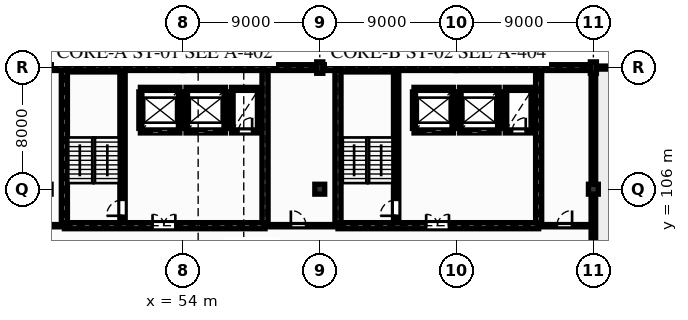
"""IFC4 building model, lengths in metres.
Left out: names, types, materials, properties, quantities, classifications, styles, units other than length and angle.
Written with IfcOpenShell. Run it as: python <this file> out.ifc"""

import sys

from ifc_helpers import new_model, si_unit, direction, frame, frame_2d, origin, origin_2d, place, context, subcontext, project, spatial, rectangle, extrude, element, fill, save


model = new_model("IFC4")
c1 = context("Model", 3, precision=1e-05, world=origin(), true_north=direction((0.0, 1.0)))
c2 = subcontext(c1, "Body", "Model", "MODEL_VIEW")
j1 = project(units=[si_unit("LENGTHUNIT", "METRE"), si_unit("PLANEANGLEUNIT", "RADIAN")], contexts=[c1])
p1 = place(None, origin())
s1 = spatial("IfcSite", under=j1, at=p1, CompositionType="ELEMENT")
p2 = place(p1, origin())
s2 = spatial("IfcBuilding", under=s1, at=p2, CompositionType="ELEMENT")
p3 = place(p2, frame((0.0, 0.0, 16.52)))
s3 = spatial("IfcBuildingStorey", under=s2, at=p3, CompositionType="ELEMENT", Elevation=16.52)
p4 = place(p3, frame((63.0, 106.0, 0.0), z_axis=(0.0, 0.0, 1.0), x_axis=(1.0, 0.0, 0.0)))
e1 = element("IfcColumn", 1, at=p4, inside=s3, PredefinedType="COLUMN", context=c2, shape_type="SweptSolid", body=[
    extrude(rectangle(XDim=0.65, YDim=0.65, at=origin_2d()), origin(), (0.0, 0.0, 1.0), 3.74),
])
p5 = place(p3, frame((63.0, 114.0, 0.0), z_axis=(0.0, 0.0, 1.0), x_axis=(0.0, 1.0, 0.0)))
e2 = element("IfcColumn", 2, at=p5, inside=s3, PredefinedType="COLUMN", context=c2, shape_type="SweptSolid", body=[
    extrude(rectangle(XDim=0.4, YDim=0.75, at=origin_2d()), origin(), (0.0, 0.0, 1.0), 3.74),
])
p6 = place(p3, frame((81.0, 106.0, 0.0), z_axis=(0.0, 0.0, 1.0), x_axis=(1.0, 0.0, 0.0)))
e3 = element("IfcColumn", 3, at=p6, inside=s3, PredefinedType="COLUMN", context=c2, shape_type="SweptSolid", body=[
    extrude(rectangle(XDim=0.65, YDim=0.65, at=origin_2d()), origin(), (0.0, 0.0, 1.0), 3.74),
])
p7 = place(p3, frame((81.0, 114.0, 0.0), z_axis=(0.0, 0.0, 1.0), x_axis=(0.0, 1.0, 0.0)))
e4 = element("IfcColumn", 4, at=p7, inside=s3, PredefinedType="COLUMN", context=c2, shape_type="SweptSolid", body=[
    extrude(rectangle(XDim=0.4, YDim=0.75, at=origin_2d()), origin(), (0.0, 0.0, 1.0), 3.74),
])
for number, where, z_axis, x_axis in (
    (5, (45.0, 114.0, 0.0), (0.0, 0.0, 1.0), (1.0, 0.0, 0.0)),
    (6, (54.0, 114.0, 0.0), (0.0, 0.0, 1.0), (1.0, 0.0, 0.0)),
    (7, (63.0, 114.0, 0.0), (0.0, 0.0, 1.0), (1.0, 0.0, 0.0)),
    (8, (72.0, 114.0, 0.0), (0.0, 0.0, 1.0), (1.0, 0.0, 0.0)),
):
    element("IfcWall", number, at=place(p3, frame(where, z_axis=z_axis, x_axis=x_axis)), inside=s3, PredefinedType="SOLIDWALL", context=c2, shape_type="SweptSolid", body=[
        extrude(rectangle(XDim=9.0, YDim=0.38, at=frame_2d((4.5, 0.0))), origin(), (0.0, 0.0, 1.0), 3.46),
    ])
p8 = place(p3, frame((81.0, 90.0, 0.0), z_axis=(0.0, 0.0, 1.0), x_axis=(0.0, 1.0, 0.0)))
e9 = element("IfcWall", 9, at=p8, inside=s3, PredefinedType="SOLIDWALL", context=c2, shape_type="SweptSolid", body=[
    extrude(rectangle(XDim=24.0, YDim=0.3, at=frame_2d((12.0, 0.0))), origin(), (0.0, 0.0, 1.0), 2.65),
])
p9 = place(p8, frame((3.2, 0.0, 0.43)))
e10 = element("IfcOpeningElement", 10, at=p9, cuts=e9, PredefinedType="OPENING", context=c2, shape_type="SweptSolid", body=[
    extrude(rectangle(XDim=1.5, YDim=2.1, at=frame_2d((0.75, 1.05))), frame((0.0, 0.16, 0.0), z_axis=(0.0, -1.0, 0.0), x_axis=(1.0, 0.0, 0.0)), (0.0, 0.0, 1.0), 0.32),
])
p10 = place(p8, frame((10.5, 0.0, 0.68)))
e11 = element("IfcOpeningElement", 11, at=p10, cuts=e9, PredefinedType="OPENING", context=c2, shape_type="SweptSolid", body=[
    extrude(rectangle(XDim=1.35, YDim=1.85, at=frame_2d((0.675, 0.925))), frame((0.0, 0.16, 0.0), z_axis=(0.0, -1.0, 0.0), x_axis=(1.0, 0.0, 0.0)), (0.0, 0.0, 1.0), 0.32),
])
p11 = place(p3, frame((89.8, 114.0, 0.0), z_axis=(0.0, 0.0, 1.0), x_axis=(-1.0, 0.0, 0.0)))
e12 = element("IfcWall", 12, at=p11, inside=s3, PredefinedType="PARAPET", context=c2, shape_type="SweptSolid", body=[
    extrude(rectangle(XDim=8.6, YDim=0.2, at=frame_2d((4.3, 0.0))), origin(), (0.0, 0.0, 1.0), 0.72),
])
p12 = place(p3, frame((46.2, 103.6, 0.0), z_axis=(0.0, 0.0, 1.0), x_axis=(1.0, 0.0, 0.0)))
e13 = element("IfcWall", 13, at=p12, inside=s3, PredefinedType="SHEAR", context=c2, shape_type="SweptSolid", body=[
    extrude(rectangle(XDim=13.2, YDim=0.4, at=frame_2d((6.6, 0.0))), origin(), (0.0, 0.0, 1.0), 3.46),
])
p13 = place(p12, frame((5.8, 0.0, 0.0)))
e14 = element("IfcOpeningElement", 14, at=p13, cuts=e13, PredefinedType="OPENING", context=c2, shape_type="SweptSolid", body=[
    extrude(rectangle(XDim=1.5, YDim=2.2, at=frame_2d((0.75, 1.1))), frame((0.0, 0.21, 0.0), z_axis=(0.0, -1.0, 0.0), x_axis=(1.0, 0.0, 0.0)), (0.0, 0.0, 1.0), 0.42),
])
for number, where, z_axis, x_axis in (
    (15, (46.2, 103.8, 0.0), (0.0, 0.0, 1.0), (0.0, 1.0, 0.0)),
    (16, (59.4, 103.8, 0.0), (0.0, 0.0, 1.0), (0.0, 1.0, 0.0)),
):
    element("IfcWall", number, at=place(p3, frame(where, z_axis=z_axis, x_axis=x_axis)), inside=s3, PredefinedType="SHEAR", context=c2, shape_type="SweptSolid", body=[
        extrude(rectangle(XDim=10.01, YDim=0.4, at=frame_2d((5.005, 0.0))), origin(), (0.0, 0.0, 1.0), 3.46),
    ])
p14 = place(p3, frame((50.025, 103.8, 0.0), z_axis=(0.0, 0.0, 1.0), x_axis=(0.0, 1.0, 0.0)))
e17 = element("IfcWall", 17, at=p14, inside=s3, PredefinedType="SHEAR", context=c2, shape_type="SweptSolid", body=[
    extrude(rectangle(XDim=10.01, YDim=0.35, at=frame_2d((5.005, 0.0))), origin(), (0.0, 0.0, 1.0), 3.46),
])
p15 = place(p14, frame((0.45, 0.0, 0.0)))
e18 = element("IfcOpeningElement", 18, at=p15, cuts=e17, PredefinedType="OPENING", context=c2, shape_type="SweptSolid", body=[
    extrude(rectangle(XDim=1.05, YDim=2.2, at=frame_2d((0.525, 1.1))), frame((0.0, 0.185, 0.0), z_axis=(0.0, -1.0, 0.0), x_axis=(1.0, 0.0, 0.0)), (0.0, 0.0, 1.0), 0.37),
])
p16 = place(p3, frame((51.2, 109.8, 0.0), z_axis=(0.0, 0.0, 1.0), x_axis=(1.0, 0.0, 0.0)))
e19 = element("IfcWall", 19, at=p16, inside=s3, PredefinedType="PARTITIONING", context=c2, shape_type="SweptSolid", body=[
    extrude(rectangle(XDim=2.6, YDim=0.2, at=frame_2d((1.3, 0.0))), origin(), (0.0, 0.0, 1.0), 3.46),
])
p17 = place(p16, frame((0.75, 0.0, 0.0)))
e20 = element("IfcOpeningElement", 20, at=p17, cuts=e19, PredefinedType="OPENING", context=c2, shape_type="SweptSolid", body=[
    extrude(rectangle(XDim=1.1, YDim=2.15, at=frame_2d((0.55, 1.075))), frame((0.0, 0.11, 0.0), z_axis=(0.0, -1.0, 0.0), x_axis=(1.0, 0.0, 0.0)), (0.0, 0.0, 1.0), 0.22),
])
p18 = place(p3, frame((51.2, 112.6, 0.0), z_axis=(0.0, 0.0, 1.0), x_axis=(1.0, 0.0, 0.0)))
e21 = element("IfcWall", 21, at=p18, inside=s3, PredefinedType="PARTITIONING", context=c2, shape_type="SweptSolid", body=[
    extrude(rectangle(XDim=2.6, YDim=0.2, at=frame_2d((1.3, 0.0))), origin(), (0.0, 0.0, 1.0), 3.46),
])
for number, where, z_axis, x_axis in (
    (22, (51.2, 110.0, 0.0), (0.0, 0.0, 1.0), (0.0, 1.0, 0.0)),
    (23, (53.8, 110.0, 0.0), (0.0, 0.0, 1.0), (0.0, 1.0, 0.0)),
):
    element("IfcWall", number, at=place(p3, frame(where, z_axis=z_axis, x_axis=x_axis)), inside=s3, PredefinedType="PARTITIONING", context=c2, shape_type="SweptSolid", body=[
        extrude(rectangle(XDim=2.4, YDim=0.2, at=frame_2d((1.2, 0.0))), origin(), (0.0, 0.0, 1.0), 3.46),
    ])
p19 = place(p3, frame((54.2, 109.8, 0.0), z_axis=(0.0, 0.0, 1.0), x_axis=(1.0, 0.0, 0.0)))
e24 = element("IfcWall", 24, at=p19, inside=s3, PredefinedType="PARTITIONING", context=c2, shape_type="SweptSolid", body=[
    extrude(rectangle(XDim=2.6, YDim=0.2, at=frame_2d((1.3, 0.0))), origin(), (0.0, 0.0, 1.0), 3.46),
])
p20 = place(p19, frame((0.75, 0.0, 0.0)))
e25 = element("IfcOpeningElement", 25, at=p20, cuts=e24, PredefinedType="OPENING", context=c2, shape_type="SweptSolid", body=[
    extrude(rectangle(XDim=1.1, YDim=2.15, at=frame_2d((0.55, 1.075))), frame((0.0, 0.11, 0.0), z_axis=(0.0, -1.0, 0.0), x_axis=(1.0, 0.0, 0.0)), (0.0, 0.0, 1.0), 0.22),
])
p21 = place(p3, frame((54.2, 112.6, 0.0), z_axis=(0.0, 0.0, 1.0), x_axis=(1.0, 0.0, 0.0)))
e26 = element("IfcWall", 26, at=p21, inside=s3, PredefinedType="PARTITIONING", context=c2, shape_type="SweptSolid", body=[
    extrude(rectangle(XDim=2.6, YDim=0.2, at=frame_2d((1.3, 0.0))), origin(), (0.0, 0.0, 1.0), 3.46),
])
for number, where, z_axis, x_axis in (
    (27, (54.2, 110.0, 0.0), (0.0, 0.0, 1.0), (0.0, 1.0, 0.0)),
    (28, (56.8, 110.0, 0.0), (0.0, 0.0, 1.0), (0.0, 1.0, 0.0)),
):
    element("IfcWall", number, at=place(p3, frame(where, z_axis=z_axis, x_axis=x_axis)), inside=s3, PredefinedType="PARTITIONING", context=c2, shape_type="SweptSolid", body=[
        extrude(rectangle(XDim=2.4, YDim=0.2, at=frame_2d((1.2, 0.0))), origin(), (0.0, 0.0, 1.0), 3.46),
    ])
p22 = place(p3, frame((57.2, 109.8, 0.0), z_axis=(0.0, 0.0, 1.0), x_axis=(1.0, 0.0, 0.0)))
e29 = element("IfcWall", 29, at=p22, inside=s3, PredefinedType="PARTITIONING", context=c2, shape_type="SweptSolid", body=[
    extrude(rectangle(XDim=1.8, YDim=0.2, at=frame_2d((0.9, 0.0))), origin(), (0.0, 0.0, 1.0), 3.46),
])
p23 = place(p22, frame((0.45, 0.0, 0.0)))
e30 = element("IfcOpeningElement", 30, at=p23, cuts=e29, PredefinedType="OPENING", context=c2, shape_type="SweptSolid", body=[
    extrude(rectangle(XDim=0.9, YDim=2.1, at=frame_2d((0.45, 1.05))), frame((0.0, 0.11, 0.0), z_axis=(0.0, -1.0, 0.0), x_axis=(1.0, 0.0, 0.0)), (0.0, 0.0, 1.0), 0.22),
])
p24 = place(p3, frame((57.2, 112.6, 0.0), z_axis=(0.0, 0.0, 1.0), x_axis=(1.0, 0.0, 0.0)))
e31 = element("IfcWall", 31, at=p24, inside=s3, PredefinedType="PARTITIONING", context=c2, shape_type="SweptSolid", body=[
    extrude(rectangle(XDim=1.8, YDim=0.2, at=frame_2d((0.9, 0.0))), origin(), (0.0, 0.0, 1.0), 3.46),
])
for number, where, z_axis, x_axis in (
    (32, (57.2, 110.0, 0.0), (0.0, 0.0, 1.0), (0.0, 1.0, 0.0)),
    (33, (59.0, 110.0, 0.0), (0.0, 0.0, 1.0), (0.0, 1.0, 0.0)),
):
    element("IfcWall", number, at=place(p3, frame(where, z_axis=z_axis, x_axis=x_axis)), inside=s3, PredefinedType="PARTITIONING", context=c2, shape_type="SweptSolid", body=[
        extrude(rectangle(XDim=2.4, YDim=0.2, at=frame_2d((1.2, 0.0))), origin(), (0.0, 0.0, 1.0), 3.46),
    ])
p25 = place(p3, frame((64.2, 103.6, 0.0), z_axis=(0.0, 0.0, 1.0), x_axis=(1.0, 0.0, 0.0)))
e34 = element("IfcWall", 34, at=p25, inside=s3, PredefinedType="SHEAR", context=c2, shape_type="SweptSolid", body=[
    extrude(rectangle(XDim=13.2, YDim=0.4, at=frame_2d((6.6, 0.0))), origin(), (0.0, 0.0, 1.0), 3.46),
])
p26 = place(p25, frame((5.8, 0.0, 0.0)))
e35 = element("IfcOpeningElement", 35, at=p26, cuts=e34, PredefinedType="OPENING", context=c2, shape_type="SweptSolid", body=[
    extrude(rectangle(XDim=1.5, YDim=2.2, at=frame_2d((0.75, 1.1))), frame((0.0, 0.21, 0.0), z_axis=(0.0, -1.0, 0.0), x_axis=(1.0, 0.0, 0.0)), (0.0, 0.0, 1.0), 0.42),
])
for number, where, z_axis, x_axis in (
    (36, (64.2, 103.8, 0.0), (0.0, 0.0, 1.0), (0.0, 1.0, 0.0)),
    (37, (77.4, 103.8, 0.0), (0.0, 0.0, 1.0), (0.0, 1.0, 0.0)),
):
    element("IfcWall", number, at=place(p3, frame(where, z_axis=z_axis, x_axis=x_axis)), inside=s3, PredefinedType="SHEAR", context=c2, shape_type="SweptSolid", body=[
        extrude(rectangle(XDim=10.01, YDim=0.4, at=frame_2d((5.005, 0.0))), origin(), (0.0, 0.0, 1.0), 3.46),
    ])
p27 = place(p3, frame((68.025, 103.8, 0.0), z_axis=(0.0, 0.0, 1.0), x_axis=(0.0, 1.0, 0.0)))
e38 = element("IfcWall", 38, at=p27, inside=s3, PredefinedType="SHEAR", context=c2, shape_type="SweptSolid", body=[
    extrude(rectangle(XDim=10.01, YDim=0.35, at=frame_2d((5.005, 0.0))), origin(), (0.0, 0.0, 1.0), 3.46),
])
p28 = place(p27, frame((0.45, 0.0, 0.0)))
e39 = element("IfcOpeningElement", 39, at=p28, cuts=e38, PredefinedType="OPENING", context=c2, shape_type="SweptSolid", body=[
    extrude(rectangle(XDim=1.05, YDim=2.2, at=frame_2d((0.525, 1.1))), frame((0.0, 0.185, 0.0), z_axis=(0.0, -1.0, 0.0), x_axis=(1.0, 0.0, 0.0)), (0.0, 0.0, 1.0), 0.37),
])
p29 = place(p3, frame((69.2, 109.8, 0.0), z_axis=(0.0, 0.0, 1.0), x_axis=(1.0, 0.0, 0.0)))
e40 = element("IfcWall", 40, at=p29, inside=s3, PredefinedType="PARTITIONING", context=c2, shape_type="SweptSolid", body=[
    extrude(rectangle(XDim=2.6, YDim=0.2, at=frame_2d((1.3, 0.0))), origin(), (0.0, 0.0, 1.0), 3.46),
])
p30 = place(p29, frame((0.75, 0.0, 0.0)))
e41 = element("IfcOpeningElement", 41, at=p30, cuts=e40, PredefinedType="OPENING", context=c2, shape_type="SweptSolid", body=[
    extrude(rectangle(XDim=1.1, YDim=2.15, at=frame_2d((0.55, 1.075))), frame((0.0, 0.11, 0.0), z_axis=(0.0, -1.0, 0.0), x_axis=(1.0, 0.0, 0.0)), (0.0, 0.0, 1.0), 0.22),
])
p31 = place(p3, frame((69.2, 112.6, 0.0), z_axis=(0.0, 0.0, 1.0), x_axis=(1.0, 0.0, 0.0)))
e42 = element("IfcWall", 42, at=p31, inside=s3, PredefinedType="PARTITIONING", context=c2, shape_type="SweptSolid", body=[
    extrude(rectangle(XDim=2.6, YDim=0.2, at=frame_2d((1.3, 0.0))), origin(), (0.0, 0.0, 1.0), 3.46),
])
for number, where, z_axis, x_axis in (
    (43, (69.2, 110.0, 0.0), (0.0, 0.0, 1.0), (0.0, 1.0, 0.0)),
    (44, (71.8, 110.0, 0.0), (0.0, 0.0, 1.0), (0.0, 1.0, 0.0)),
):
    element("IfcWall", number, at=place(p3, frame(where, z_axis=z_axis, x_axis=x_axis)), inside=s3, PredefinedType="PARTITIONING", context=c2, shape_type="SweptSolid", body=[
        extrude(rectangle(XDim=2.4, YDim=0.2, at=frame_2d((1.2, 0.0))), origin(), (0.0, 0.0, 1.0), 3.46),
    ])
p32 = place(p3, frame((72.2, 109.8, 0.0), z_axis=(0.0, 0.0, 1.0), x_axis=(1.0, 0.0, 0.0)))
e45 = element("IfcWall", 45, at=p32, inside=s3, PredefinedType="PARTITIONING", context=c2, shape_type="SweptSolid", body=[
    extrude(rectangle(XDim=2.6, YDim=0.2, at=frame_2d((1.3, 0.0))), origin(), (0.0, 0.0, 1.0), 3.46),
])
p33 = place(p32, frame((0.75, 0.0, 0.0)))
e46 = element("IfcOpeningElement", 46, at=p33, cuts=e45, PredefinedType="OPENING", context=c2, shape_type="SweptSolid", body=[
    extrude(rectangle(XDim=1.1, YDim=2.15, at=frame_2d((0.55, 1.075))), frame((0.0, 0.11, 0.0), z_axis=(0.0, -1.0, 0.0), x_axis=(1.0, 0.0, 0.0)), (0.0, 0.0, 1.0), 0.22),
])
p34 = place(p3, frame((72.2, 112.6, 0.0), z_axis=(0.0, 0.0, 1.0), x_axis=(1.0, 0.0, 0.0)))
e47 = element("IfcWall", 47, at=p34, inside=s3, PredefinedType="PARTITIONING", context=c2, shape_type="SweptSolid", body=[
    extrude(rectangle(XDim=2.6, YDim=0.2, at=frame_2d((1.3, 0.0))), origin(), (0.0, 0.0, 1.0), 3.46),
])
for number, where, z_axis, x_axis in (
    (48, (72.2, 110.0, 0.0), (0.0, 0.0, 1.0), (0.0, 1.0, 0.0)),
    (49, (74.8, 110.0, 0.0), (0.0, 0.0, 1.0), (0.0, 1.0, 0.0)),
):
    element("IfcWall", number, at=place(p3, frame(where, z_axis=z_axis, x_axis=x_axis)), inside=s3, PredefinedType="PARTITIONING", context=c2, shape_type="SweptSolid", body=[
        extrude(rectangle(XDim=2.4, YDim=0.2, at=frame_2d((1.2, 0.0))), origin(), (0.0, 0.0, 1.0), 3.46),
    ])
p35 = place(p3, frame((75.2, 109.8, 0.0), z_axis=(0.0, 0.0, 1.0), x_axis=(1.0, 0.0, 0.0)))
e50 = element("IfcWall", 50, at=p35, inside=s3, PredefinedType="PARTITIONING", context=c2, shape_type="SweptSolid", body=[
    extrude(rectangle(XDim=1.8, YDim=0.2, at=frame_2d((0.9, 0.0))), origin(), (0.0, 0.0, 1.0), 3.46),
])
p36 = place(p35, frame((0.45, 0.0, 0.0)))
e51 = element("IfcOpeningElement", 51, at=p36, cuts=e50, PredefinedType="OPENING", context=c2, shape_type="SweptSolid", body=[
    extrude(rectangle(XDim=0.9, YDim=2.1, at=frame_2d((0.45, 1.05))), frame((0.0, 0.11, 0.0), z_axis=(0.0, -1.0, 0.0), x_axis=(1.0, 0.0, 0.0)), (0.0, 0.0, 1.0), 0.22),
])
p37 = place(p3, frame((75.2, 112.6, 0.0), z_axis=(0.0, 0.0, 1.0), x_axis=(1.0, 0.0, 0.0)))
e52 = element("IfcWall", 52, at=p37, inside=s3, PredefinedType="PARTITIONING", context=c2, shape_type="SweptSolid", body=[
    extrude(rectangle(XDim=1.8, YDim=0.2, at=frame_2d((0.9, 0.0))), origin(), (0.0, 0.0, 1.0), 3.46),
])
for number, where, z_axis, x_axis in (
    (53, (75.2, 110.0, 0.0), (0.0, 0.0, 1.0), (0.0, 1.0, 0.0)),
    (54, (77.0, 110.0, 0.0), (0.0, 0.0, 1.0), (0.0, 1.0, 0.0)),
):
    element("IfcWall", number, at=place(p3, frame(where, z_axis=z_axis, x_axis=x_axis)), inside=s3, PredefinedType="PARTITIONING", context=c2, shape_type="SweptSolid", body=[
        extrude(rectangle(XDim=2.4, YDim=0.2, at=frame_2d((1.2, 0.0))), origin(), (0.0, 0.0, 1.0), 3.46),
    ])
p38 = place(p3, frame((36.0, 103.6, 0.0), z_axis=(0.0, 0.0, 1.0), x_axis=(1.0, 0.0, 0.0)))
e55 = element("IfcWall", 55, at=p38, inside=s3, PredefinedType="PARTITIONING", context=c2, shape_type="SweptSolid", body=[
    extrude(rectangle(XDim=10.2, YDim=0.15, at=frame_2d((5.1, 0.0))), origin(), (0.0, 0.0, 1.0), 3.46),
])
p39 = place(p38, frame((4.5, 0.0, 0.0)))
e56 = element("IfcOpeningElement", 56, at=p39, cuts=e55, PredefinedType="OPENING", context=c2, shape_type="SweptSolid", body=[
    extrude(rectangle(XDim=1.0, YDim=2.15, at=frame_2d((0.5, 1.075))), frame((0.0, 0.085, 0.0), z_axis=(0.0, -1.0, 0.0), x_axis=(1.0, 0.0, 0.0)), (0.0, 0.0, 1.0), 0.17),
])
p40 = place(p3, frame((59.4, 103.6, 0.0), z_axis=(0.0, 0.0, 1.0), x_axis=(1.0, 0.0, 0.0)))
e57 = element("IfcWall", 57, at=p40, inside=s3, PredefinedType="PARTITIONING", context=c2, shape_type="SweptSolid", body=[
    extrude(rectangle(XDim=4.8, YDim=0.15, at=frame_2d((2.4, 0.0))), origin(), (0.0, 0.0, 1.0), 3.46),
])
p41 = place(p40, frame((1.7, 0.0, 0.0)))
e58 = element("IfcOpeningElement", 58, at=p41, cuts=e57, PredefinedType="OPENING", context=c2, shape_type="SweptSolid", body=[
    extrude(rectangle(XDim=1.0, YDim=2.15, at=frame_2d((0.5, 1.075))), frame((0.0, 0.085, 0.0), z_axis=(0.0, -1.0, 0.0), x_axis=(1.0, 0.0, 0.0)), (0.0, 0.0, 1.0), 0.17),
])
p42 = place(p3, frame((77.4, 103.6, 0.0), z_axis=(0.0, 0.0, 1.0), x_axis=(1.0, 0.0, 0.0)))
e59 = element("IfcWall", 59, at=p42, inside=s3, PredefinedType="PARTITIONING", context=c2, shape_type="SweptSolid", body=[
    extrude(rectangle(XDim=3.6, YDim=0.15, at=frame_2d((1.8, 0.0))), origin(), (0.0, 0.0, 1.0), 3.46),
])
p43 = place(p42, frame((1.2, 0.0, 0.0)))
e60 = element("IfcOpeningElement", 60, at=p43, cuts=e59, PredefinedType="OPENING", context=c2, shape_type="SweptSolid", body=[
    extrude(rectangle(XDim=1.0, YDim=2.15, at=frame_2d((0.5, 1.075))), frame((0.0, 0.085, 0.0), z_axis=(0.0, -1.0, 0.0), x_axis=(1.0, 0.0, 0.0)), (0.0, 0.0, 1.0), 0.17),
])
p44 = place(p13, origin())
e61 = element("IfcDoor", 61, at=p44, inside=s3, OperationType="DOUBLE_DOOR_SINGLE_SWING", PredefinedType="DOOR", context=c2, shape_type="SweptSolid", body=[
    extrude(rectangle(XDim=1.5, YDim=2.2, at=frame_2d((0.75, 1.1))), frame((0.0, 0.025, 0.0), z_axis=(0.0, -1.0, 0.0), x_axis=(1.0, 0.0, 0.0)), (0.0, 0.0, 1.0), 0.05),
])
fill(e14, e61)
p45 = place(p15, origin())
e62 = element("IfcDoor", 62, at=p45, inside=s3, OperationType="SINGLE_SWING_LEFT", PredefinedType="DOOR", context=c2, shape_type="SweptSolid", body=[
    extrude(rectangle(XDim=1.05, YDim=2.2, at=frame_2d((0.525, 1.1))), frame((0.0, 0.025, 0.0), z_axis=(0.0, -1.0, 0.0), x_axis=(1.0, 0.0, 0.0)), (0.0, 0.0, 1.0), 0.05),
])
fill(e18, e62)
p46 = place(p17, origin())
e63 = element("IfcDoor", 63, at=p46, inside=s3, OperationType="SLIDING_TO_LEFT", PredefinedType="DOOR", context=c2, shape_type="SweptSolid", body=[
    extrude(rectangle(XDim=1.1, YDim=2.15, at=frame_2d((0.55, 1.075))), frame((0.0, 0.025, 0.0), z_axis=(0.0, -1.0, 0.0), x_axis=(1.0, 0.0, 0.0)), (0.0, 0.0, 1.0), 0.05),
])
fill(e20, e63)
p47 = place(p20, origin())
e64 = element("IfcDoor", 64, at=p47, inside=s3, OperationType="SLIDING_TO_RIGHT", PredefinedType="DOOR", context=c2, shape_type="SweptSolid", body=[
    extrude(rectangle(XDim=1.1, YDim=2.15, at=frame_2d((0.55, 1.075))), frame((0.0, 0.025, 0.0), z_axis=(0.0, -1.0, 0.0), x_axis=(1.0, 0.0, 0.0)), (0.0, 0.0, 1.0), 0.05),
])
fill(e25, e64)
p48 = place(p23, origin())
e65 = element("IfcDoor", 65, at=p48, inside=s3, OperationType="SINGLE_SWING_RIGHT", PredefinedType="DOOR", context=c2, shape_type="SweptSolid", body=[
    extrude(rectangle(XDim=0.9, YDim=2.1, at=frame_2d((0.45, 1.05))), frame((0.0, 0.025, 0.0), z_axis=(0.0, -1.0, 0.0), x_axis=(1.0, 0.0, 0.0)), (0.0, 0.0, 1.0), 0.05),
])
fill(e30, e65)
p49 = place(p26, origin())
e66 = element("IfcDoor", 66, at=p49, inside=s3, OperationType="DOUBLE_DOOR_SINGLE_SWING", PredefinedType="DOOR", context=c2, shape_type="SweptSolid", body=[
    extrude(rectangle(XDim=1.5, YDim=2.2, at=frame_2d((0.75, 1.1))), frame((0.0, 0.025, 0.0), z_axis=(0.0, -1.0, 0.0), x_axis=(1.0, 0.0, 0.0)), (0.0, 0.0, 1.0), 0.05),
])
fill(e35, e66)
p50 = place(p28, origin())
e67 = element("IfcDoor", 67, at=p50, inside=s3, OperationType="SINGLE_SWING_LEFT", PredefinedType="DOOR", context=c2, shape_type="SweptSolid", body=[
    extrude(rectangle(XDim=1.05, YDim=2.2, at=frame_2d((0.525, 1.1))), frame((0.0, 0.025, 0.0), z_axis=(0.0, -1.0, 0.0), x_axis=(1.0, 0.0, 0.0)), (0.0, 0.0, 1.0), 0.05),
])
fill(e39, e67)
p51 = place(p30, origin())
e68 = element("IfcDoor", 68, at=p51, inside=s3, OperationType="SLIDING_TO_LEFT", PredefinedType="DOOR", context=c2, shape_type="SweptSolid", body=[
    extrude(rectangle(XDim=1.1, YDim=2.15, at=frame_2d((0.55, 1.075))), frame((0.0, 0.025, 0.0), z_axis=(0.0, -1.0, 0.0), x_axis=(1.0, 0.0, 0.0)), (0.0, 0.0, 1.0), 0.05),
])
fill(e41, e68)
p52 = place(p33, origin())
e69 = element("IfcDoor", 69, at=p52, inside=s3, OperationType="SLIDING_TO_RIGHT", PredefinedType="DOOR", context=c2, shape_type="SweptSolid", body=[
    extrude(rectangle(XDim=1.1, YDim=2.15, at=frame_2d((0.55, 1.075))), frame((0.0, 0.025, 0.0), z_axis=(0.0, -1.0, 0.0), x_axis=(1.0, 0.0, 0.0)), (0.0, 0.0, 1.0), 0.05),
])
fill(e46, e69)
p53 = place(p36, origin())
e70 = element("IfcDoor", 70, at=p53, inside=s3, OperationType="SINGLE_SWING_RIGHT", PredefinedType="DOOR", context=c2, shape_type="SweptSolid", body=[
    extrude(rectangle(XDim=0.9, YDim=2.1, at=frame_2d((0.45, 1.05))), frame((0.0, 0.025, 0.0), z_axis=(0.0, -1.0, 0.0), x_axis=(1.0, 0.0, 0.0)), (0.0, 0.0, 1.0), 0.05),
])
fill(e51, e70)
p54 = place(p41, origin())
e71 = element("IfcDoor", 71, at=p54, inside=s3, OperationType="SINGLE_SWING_LEFT", PredefinedType="DOOR", context=c2, shape_type="SweptSolid", body=[
    extrude(rectangle(XDim=1.0, YDim=2.15, at=frame_2d((0.5, 1.075))), frame((0.0, 0.025, 0.0), z_axis=(0.0, -1.0, 0.0), x_axis=(1.0, 0.0, 0.0)), (0.0, 0.0, 1.0), 0.05),
])
fill(e58, e71)
p55 = place(p43, origin())
e72 = element("IfcDoor", 72, at=p55, inside=s3, OperationType="SINGLE_SWING_RIGHT", PredefinedType="DOOR", context=c2, shape_type="SweptSolid", body=[
    extrude(rectangle(XDim=1.0, YDim=2.15, at=frame_2d((0.5, 1.075))), frame((0.0, 0.025, 0.0), z_axis=(0.0, -1.0, 0.0), x_axis=(1.0, 0.0, 0.0)), (0.0, 0.0, 1.0), 0.05),
])
fill(e60, e72)
save(model, sys.argv[1])
